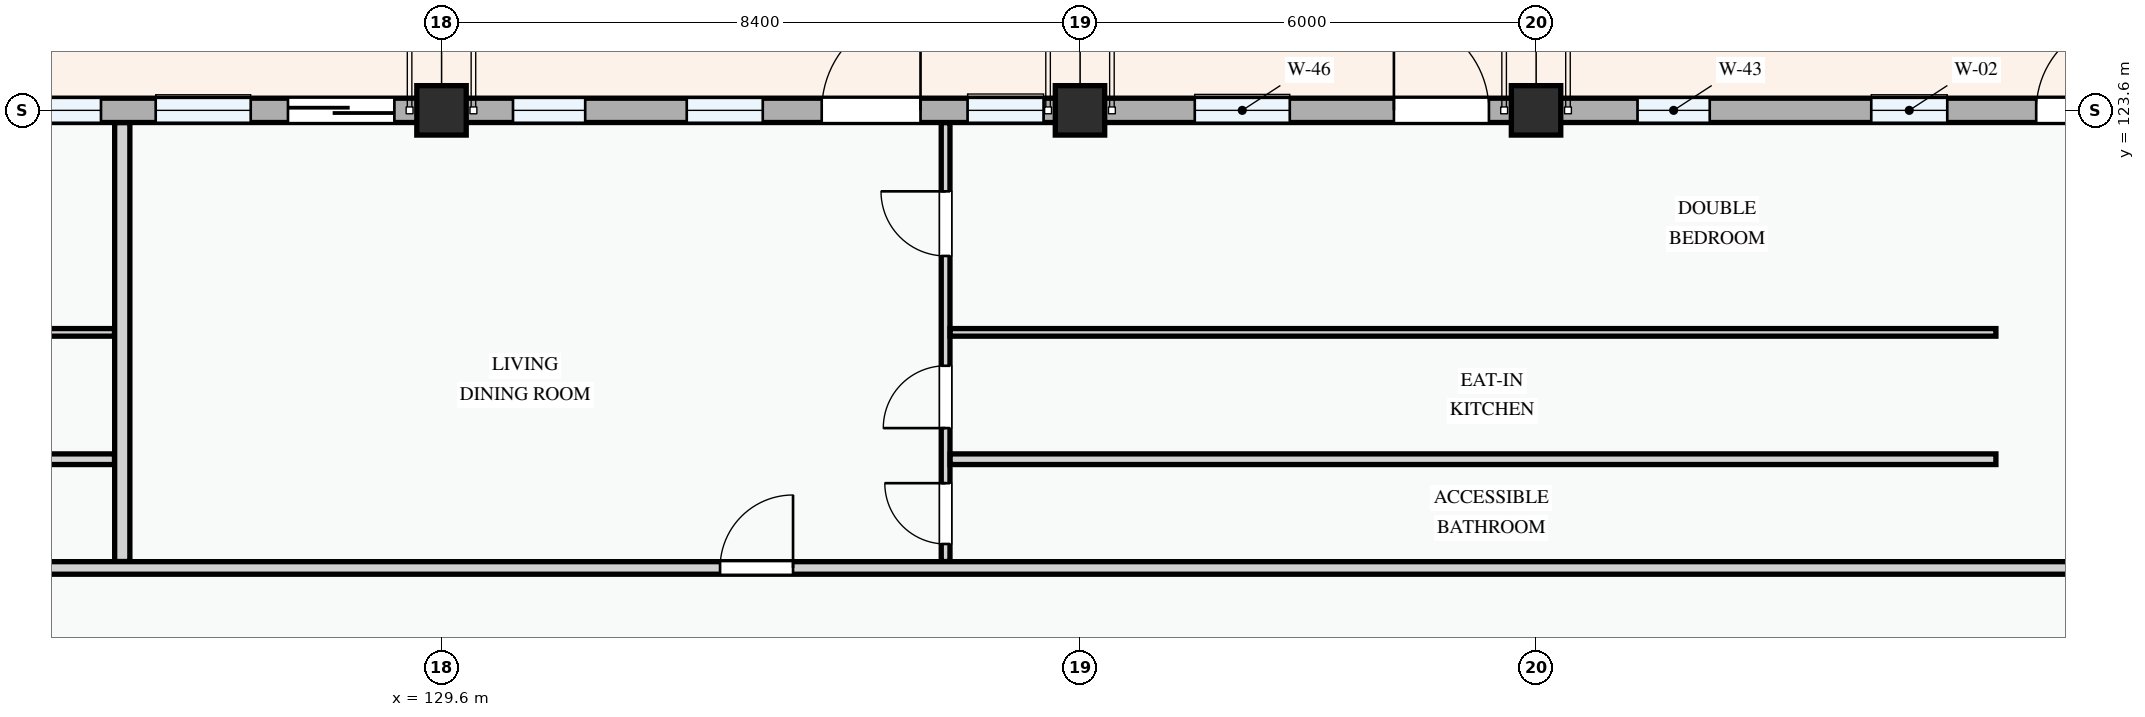
"""IFC4 building model, lengths in metres.
Left out: names, types, materials, properties, quantities, classifications, styles, units other than length and angle.
Written with IfcOpenShell. Run it as: python <this file> out.ifc"""

import sys

from ifc_helpers import new_model, si_unit, direction, frame, frame_2d, origin, origin_2d, place, context, subcontext, project, spatial, rectangle, extrude, element, fill, save


model = new_model("IFC4")
c1 = context("Model", 3, precision=1e-05, world=origin(), true_north=direction((0.0, 1.0)))
c2 = subcontext(c1, "Body", "Model", "MODEL_VIEW")
j1 = project(units=[si_unit("LENGTHUNIT", "METRE"), si_unit("PLANEANGLEUNIT", "RADIAN")], contexts=[c1])
p1 = place(None, origin())
s1 = spatial("IfcSite", under=j1, at=p1, CompositionType="ELEMENT")
p2 = place(p1, origin())
s2 = spatial("IfcBuilding", under=s1, at=p2, CompositionType="ELEMENT")
p3 = place(p2, frame((0.0, 0.0, 18.0)))
s3 = spatial("IfcBuildingStorey", under=s2, at=p3, CompositionType="ELEMENT", Elevation=18.0)
for number, where, z_axis, x_axis in (
    (1, (129.6, 123.6, 0.0), (0.0, 0.0, 1.0), (1.0, 0.0, 0.0)),
    (2, (138.0, 123.6, 0.0), (0.0, 0.0, 1.0), (1.0, 0.0, 0.0)),
    (3, (144.0, 123.6, 0.0), (0.0, 0.0, 1.0), (1.0, 0.0, 0.0)),
):
    element("IfcColumn", number, at=place(p3, frame(where, z_axis=z_axis, x_axis=x_axis)), inside=s3, PredefinedType="COLUMN", context=c2, shape_type="SweptSolid", body=[
        extrude(rectangle(XDim=0.65, YDim=0.65, at=origin_2d()), origin(), (0.0, 0.0, 1.0), 3.3),
    ])
p4 = place(p3, frame((152.4, 123.6, 0.0), z_axis=(0.0, 0.0, 1.0), x_axis=(-1.0, 0.0, 0.0)))
e4 = element("IfcWall", 4, at=p4, inside=s3, PredefinedType="STANDARD", context=c2, shape_type="SweptSolid", body=[
    extrude(rectangle(XDim=8.4, YDim=0.32, at=frame_2d((4.2, 0.0))), origin(), (0.0, 0.0, 1.0), 2.375),
])
p5 = place(p4, frame((0.62, 0.0, 0.0)))
e5 = element("IfcOpeningElement", 5, at=p5, cuts=e4, PredefinedType="OPENING", context=c2, shape_type="SweptSolid", body=[
    extrude(rectangle(XDim=1.2, YDim=2.15, at=frame_2d((0.6, 1.075))), frame((0.0, 0.17, 0.0), z_axis=(0.0, -1.0, 0.0), x_axis=(1.0, 0.0, 0.0)), (0.0, 0.0, 1.0), 0.34),
])
p6 = place(p4, frame((2.99, 0.0, 0.78)))
e6 = element("IfcOpeningElement", 6, at=p6, cuts=e4, PredefinedType="OPENING", context=c2, shape_type="SweptSolid", body=[
    extrude(rectangle(XDim=1.0, YDim=1.25, at=frame_2d((0.5, 0.625))), frame((0.0, 0.17, 0.0), z_axis=(0.0, -1.0, 0.0), x_axis=(1.0, 0.0, 0.0)), (0.0, 0.0, 1.0), 0.34),
])
p7 = place(p4, frame((6.115, 0.0, 0.78)))
e7 = element("IfcOpeningElement", 7, at=p7, cuts=e4, PredefinedType="OPENING", context=c2, shape_type="SweptSolid", body=[
    extrude(rectangle(XDim=0.95, YDim=1.15, at=frame_2d((0.475, 0.575))), frame((0.0, 0.17, 0.0), z_axis=(0.0, -1.0, 0.0), x_axis=(1.0, 0.0, 0.0)), (0.0, 0.0, 1.0), 0.34),
])
p8 = place(p3, frame((144.0, 123.6, 0.0), z_axis=(0.0, 0.0, 1.0), x_axis=(-1.0, 0.0, 0.0)))
e8 = element("IfcWall", 8, at=p8, inside=s3, PredefinedType="STANDARD", context=c2, shape_type="SweptSolid", body=[
    extrude(rectangle(XDim=6.0, YDim=0.32, at=frame_2d((3.0, 0.0))), origin(), (0.0, 0.0, 1.0), 2.475),
])
p9 = place(p8, frame((0.62, 0.0, 0.0)))
e9 = element("IfcOpeningElement", 9, at=p9, cuts=e8, PredefinedType="OPENING", context=c2, shape_type="SweptSolid", body=[
    extrude(rectangle(XDim=1.25, YDim=2.2, at=frame_2d((0.625, 1.1))), frame((0.0, 0.17, 0.0), z_axis=(0.0, -1.0, 0.0), x_axis=(1.0, 0.0, 0.0)), (0.0, 0.0, 1.0), 0.34),
])
p10 = place(p8, frame((3.24, 0.0, 0.78)))
e10 = element("IfcOpeningElement", 10, at=p10, cuts=e8, PredefinedType="OPENING", context=c2, shape_type="SweptSolid", body=[
    extrude(rectangle(XDim=1.25, YDim=1.3, at=frame_2d((0.625, 0.65))), frame((0.0, 0.17, 0.0), z_axis=(0.0, -1.0, 0.0), x_axis=(1.0, 0.0, 0.0)), (0.0, 0.0, 1.0), 0.34),
])
p11 = place(p3, frame((138.0, 123.6, 0.0), z_axis=(0.0, 0.0, 1.0), x_axis=(-1.0, 0.0, 0.0)))
e11 = element("IfcWall", 11, at=p11, inside=s3, PredefinedType="STANDARD", context=c2, shape_type="SweptSolid", body=[
    extrude(rectangle(XDim=8.4, YDim=0.32, at=frame_2d((4.2, 0.0))), origin(), (0.0, 0.0, 1.0), 2.375),
])
p12 = place(p11, frame((2.098, 0.0, 0.0)))
e12 = element("IfcOpeningElement", 12, at=p12, cuts=e11, PredefinedType="OPENING", context=c2, shape_type="SweptSolid", body=[
    extrude(rectangle(XDim=1.3, YDim=2.15, at=frame_2d((0.65, 1.075))), frame((0.0, 0.17, 0.0), z_axis=(0.0, -1.0, 0.0), x_axis=(1.0, 0.0, 0.0)), (0.0, 0.0, 1.0), 0.34),
])
p13 = place(p11, frame((0.479, 0.0, 0.78)))
e13 = element("IfcOpeningElement", 13, at=p13, cuts=e11, PredefinedType="OPENING", context=c2, shape_type="SweptSolid", body=[
    extrude(rectangle(XDim=1.0, YDim=1.25, at=frame_2d((0.5, 0.625))), frame((0.0, 0.17, 0.0), z_axis=(0.0, -1.0, 0.0), x_axis=(1.0, 0.0, 0.0)), (0.0, 0.0, 1.0), 0.34),
])
p14 = place(p11, frame((4.174, 0.0, 0.78)))
e14 = element("IfcOpeningElement", 14, at=p14, cuts=e11, PredefinedType="OPENING", context=c2, shape_type="SweptSolid", body=[
    extrude(rectangle(XDim=1.0, YDim=1.25, at=frame_2d((0.5, 0.625))), frame((0.0, 0.17, 0.0), z_axis=(0.0, -1.0, 0.0), x_axis=(1.0, 0.0, 0.0)), (0.0, 0.0, 1.0), 0.34),
])
p15 = place(p11, frame((6.51, 0.0, 0.78)))
e15 = element("IfcOpeningElement", 15, at=p15, cuts=e11, PredefinedType="OPENING", context=c2, shape_type="SweptSolid", body=[
    extrude(rectangle(XDim=0.95, YDim=1.15, at=frame_2d((0.475, 0.575))), frame((0.0, 0.17, 0.0), z_axis=(0.0, -1.0, 0.0), x_axis=(1.0, 0.0, 0.0)), (0.0, 0.0, 1.0), 0.34),
])
p16 = place(p3, frame((129.6, 123.6, 0.0), z_axis=(0.0, 0.0, 1.0), x_axis=(-1.0, 0.0, 0.0)))
e16 = element("IfcWall", 16, at=p16, inside=s3, PredefinedType="STANDARD", context=c2, shape_type="SweptSolid", body=[
    extrude(rectangle(XDim=6.0, YDim=0.32, at=frame_2d((3.0, 0.0))), origin(), (0.0, 0.0, 1.0), 2.475),
])
p17 = place(p16, frame((0.62, 0.0, 0.0)))
e17 = element("IfcOpeningElement", 17, at=p17, cuts=e16, PredefinedType="OPENING", context=c2, shape_type="SweptSolid", body=[
    extrude(rectangle(XDim=1.4, YDim=2.2, at=frame_2d((0.7, 1.1))), frame((0.0, 0.17, 0.0), z_axis=(0.0, -1.0, 0.0), x_axis=(1.0, 0.0, 0.0)), (0.0, 0.0, 1.0), 0.34),
])
p18 = place(p16, frame((2.51, 0.0, 0.78)))
e18 = element("IfcOpeningElement", 18, at=p18, cuts=e16, PredefinedType="OPENING", context=c2, shape_type="SweptSolid", body=[
    extrude(rectangle(XDim=1.25, YDim=1.45, at=frame_2d((0.625, 0.725))), frame((0.0, 0.17, 0.0), z_axis=(0.0, -1.0, 0.0), x_axis=(1.0, 0.0, 0.0)), (0.0, 0.0, 1.0), 0.34),
])
p19 = place(p16, frame((4.48, 0.0, 0.78)))
e19 = element("IfcOpeningElement", 19, at=p19, cuts=e16, PredefinedType="OPENING", context=c2, shape_type="SweptSolid", body=[
    extrude(rectangle(XDim=1.05, YDim=1.2, at=frame_2d((0.525, 0.6))), frame((0.0, 0.17, 0.0), z_axis=(0.0, -1.0, 0.0), x_axis=(1.0, 0.0, 0.0)), (0.0, 0.0, 1.0), 0.34),
])
p20 = place(p3, frame((113.472, 120.679, 0.0), z_axis=(0.0, 0.0, 1.0), x_axis=(1.0, 0.0, 0.0)))
e20 = element("IfcWall", 20, at=p20, inside=s3, PredefinedType="PARTITIONING", context=c2, shape_type="SweptSolid", body=[
    extrude(rectangle(XDim=11.826, YDim=0.1, at=frame_2d((5.913, 0.0))), origin(), (0.0, 0.0, 1.0), 3.0),
])
p21 = place(p3, frame((113.472, 119.01, 0.0), z_axis=(0.0, 0.0, 1.0), x_axis=(1.0, 0.0, 0.0)))
e21 = element("IfcWall", 21, at=p21, inside=s3, PredefinedType="PARTITIONING", context=c2, shape_type="SweptSolid", body=[
    extrude(rectangle(XDim=11.826, YDim=0.14, at=frame_2d((5.913, 0.0))), origin(), (0.0, 0.0, 1.0), 3.0),
])
p22 = place(p3, frame((136.232, 117.665, 0.0), z_axis=(0.0, 0.0, 1.0), x_axis=(0.0, 1.0, 0.0)))
e22 = element("IfcWall", 22, at=p22, inside=s3, PredefinedType="PARTITIONING", context=c2, shape_type="SweptSolid", body=[
    extrude(rectangle(XDim=5.773, YDim=0.115, at=frame_2d((2.887, 0.0))), origin(), (0.0, 0.0, 1.0), 3.0),
])
p23 = place(p22, frame((0.231, 0.0, 0.0)))
e23 = element("IfcOpeningElement", 23, at=p23, cuts=e22, PredefinedType="OPENING", context=c2, shape_type="SweptSolid", body=[
    extrude(rectangle(XDim=0.8, YDim=2.1, at=frame_2d((0.4, 1.05))), frame((0.0, 0.067, 0.0), z_axis=(0.0, -1.0, 0.0), x_axis=(1.0, 0.0, 0.0)), (0.0, 0.0, 1.0), 0.135),
])
p24 = place(p22, frame((1.755, 0.0, 0.0)))
e24 = element("IfcOpeningElement", 24, at=p24, cuts=e22, PredefinedType="OPENING", context=c2, shape_type="SweptSolid", body=[
    extrude(rectangle(XDim=0.82, YDim=2.08, at=frame_2d((0.41, 1.04))), frame((0.0, 0.067, 0.0), z_axis=(0.0, -1.0, 0.0), x_axis=(1.0, 0.0, 0.0)), (0.0, 0.0, 1.0), 0.135),
])
p25 = place(p22, frame((4.02, 0.0, 0.0)))
e25 = element("IfcOpeningElement", 25, at=p25, cuts=e22, PredefinedType="OPENING", context=c2, shape_type="SweptSolid", body=[
    extrude(rectangle(XDim=0.85, YDim=2.1, at=frame_2d((0.425, 1.05))), frame((0.0, 0.067, 0.0), z_axis=(0.0, -1.0, 0.0), x_axis=(1.0, 0.0, 0.0)), (0.0, 0.0, 1.0), 0.135),
])
p26 = place(p3, frame((136.292, 120.679, 0.0), z_axis=(0.0, 0.0, 1.0), x_axis=(1.0, 0.0, 0.0)))
e26 = element("IfcWall", 26, at=p26, inside=s3, PredefinedType="PARTITIONING", context=c2, shape_type="SweptSolid", body=[
    extrude(rectangle(XDim=13.759, YDim=0.1, at=frame_2d((6.879, 0.0))), origin(), (0.0, 0.0, 1.0), 3.0),
])
p27 = place(p3, frame((136.292, 119.01, 0.0), z_axis=(0.0, 0.0, 1.0), x_axis=(1.0, 0.0, 0.0)))
e27 = element("IfcWall", 27, at=p27, inside=s3, PredefinedType="PARTITIONING", context=c2, shape_type="SweptSolid", body=[
    extrude(rectangle(XDim=13.759, YDim=0.14, at=frame_2d((6.879, 0.0))), origin(), (0.0, 0.0, 1.0), 3.0),
])
p28 = place(p3, frame((125.4, 117.665, 0.0), z_axis=(0.0, 0.0, 1.0), x_axis=(0.0, 1.0, 0.0)))
e28 = element("IfcWall", 28, at=p28, inside=s3, PredefinedType="PARTITIONING", context=c2, shape_type="SweptSolid", body=[
    extrude(rectangle(XDim=5.773, YDim=0.2, at=frame_2d((2.887, 0.0))), origin(), (0.0, 0.0, 1.0), 3.0),
])
p29 = place(p3, frame((80.562, 117.58, 0.0), z_axis=(0.0, 0.0, 1.0), x_axis=(1.0, 0.0, 0.0)))
e29 = element("IfcWall", 29, at=p29, inside=s3, PredefinedType="PARTITIONING", context=c2, shape_type="SweptSolid", body=[
    extrude(rectangle(XDim=71.978, YDim=0.165, at=frame_2d((35.989, 0.0))), origin(), (0.0, 0.0, 1.0), 3.0),
])
p30 = place(p29, frame((9.286, 0.0, 0.0)))
e30 = element("IfcOpeningElement", 30, at=p30, cuts=e29, PredefinedType="OPENING", context=c2, shape_type="SweptSolid", body=[
    extrude(rectangle(XDim=0.92, YDim=2.1, at=frame_2d((0.46, 1.05))), frame((0.0, 0.093, 0.0), z_axis=(0.0, -1.0, 0.0), x_axis=(1.0, 0.0, 0.0)), (0.0, 0.0, 1.0), 0.185),
])
p31 = place(p29, frame((23.993, 0.0, 0.0)))
e31 = element("IfcOpeningElement", 31, at=p31, cuts=e29, PredefinedType="OPENING", context=c2, shape_type="SweptSolid", body=[
    extrude(rectangle(XDim=0.92, YDim=2.1, at=frame_2d((0.46, 1.05))), frame((0.0, 0.093, 0.0), z_axis=(0.0, -1.0, 0.0), x_axis=(1.0, 0.0, 0.0)), (0.0, 0.0, 1.0), 0.185),
])
p32 = place(p29, frame((52.703, 0.0, 0.0)))
e32 = element("IfcOpeningElement", 32, at=p32, cuts=e29, PredefinedType="OPENING", context=c2, shape_type="SweptSolid", body=[
    extrude(rectangle(XDim=0.96, YDim=2.12, at=frame_2d((0.48, 1.06))), frame((0.0, 0.093, 0.0), z_axis=(0.0, -1.0, 0.0), x_axis=(1.0, 0.0, 0.0)), (0.0, 0.0, 1.0), 0.185),
])
p33 = place(p5, frame((1.2, 0.0, 0.0), z_axis=(0.0, 0.0, 1.0), x_axis=(-1.0, 0.0, 0.0)))
e33 = element("IfcDoor", 33, at=p33, inside=s3, OperationType="SINGLE_SWING_RIGHT", PredefinedType="DOOR", context=c2, shape_type="SweptSolid", body=[
    extrude(rectangle(XDim=1.2, YDim=2.15, at=frame_2d((0.6, 1.075))), frame((0.0, 0.025, 0.0), z_axis=(0.0, -1.0, 0.0), x_axis=(1.0, 0.0, 0.0)), (0.0, 0.0, 1.0), 0.05),
])
fill(e5, e33)
p34 = place(p6, origin())
e34 = element("IfcWindow", 34, at=p34, inside=s3, PartitioningType="SINGLE_PANEL", PredefinedType="WINDOW", context=c2, shape_type="SweptSolid", body=[
    extrude(rectangle(XDim=1.0, YDim=1.25, at=frame_2d((0.5, 0.625))), frame((0.0, 0.03, 0.0), z_axis=(0.0, -1.0, 0.0), x_axis=(1.0, 0.0, 0.0)), (0.0, 0.0, 1.0), 0.06),
])
fill(e6, e34)
p35 = place(p7, origin())
e35 = element("IfcWindow", 35, at=p35, inside=s3, PartitioningType="SINGLE_PANEL", PredefinedType="WINDOW", context=c2, shape_type="SweptSolid", body=[
    extrude(rectangle(XDim=0.95, YDim=1.15, at=frame_2d((0.475, 0.575))), frame((0.0, 0.03, 0.0), z_axis=(0.0, -1.0, 0.0), x_axis=(1.0, 0.0, 0.0)), (0.0, 0.0, 1.0), 0.06),
])
fill(e7, e35)
p36 = place(p9, frame((1.25, 0.0, 0.0), z_axis=(0.0, 0.0, 1.0), x_axis=(-1.0, 0.0, 0.0)))
e36 = element("IfcDoor", 36, at=p36, inside=s3, OperationType="SINGLE_SWING_LEFT", PredefinedType="DOOR", context=c2, shape_type="SweptSolid", body=[
    extrude(rectangle(XDim=1.25, YDim=2.2, at=frame_2d((0.625, 1.1))), frame((0.0, 0.025, 0.0), z_axis=(0.0, -1.0, 0.0), x_axis=(1.0, 0.0, 0.0)), (0.0, 0.0, 1.0), 0.05),
])
fill(e9, e36)
p37 = place(p10, origin())
e37 = element("IfcWindow", 37, at=p37, inside=s3, PartitioningType="SINGLE_PANEL", PredefinedType="WINDOW", context=c2, shape_type="SweptSolid", body=[
    extrude(rectangle(XDim=1.25, YDim=1.3, at=frame_2d((0.625, 0.65))), frame((0.0, 0.03, 0.0), z_axis=(0.0, -1.0, 0.0), x_axis=(1.0, 0.0, 0.0)), (0.0, 0.0, 1.0), 0.06),
])
fill(e10, e37)
p38 = place(p12, frame((1.3, 0.0, 0.0), z_axis=(0.0, 0.0, 1.0), x_axis=(-1.0, 0.0, 0.0)))
e38 = element("IfcDoor", 38, at=p38, inside=s3, OperationType="SINGLE_SWING_RIGHT", PredefinedType="DOOR", context=c2, shape_type="SweptSolid", body=[
    extrude(rectangle(XDim=1.3, YDim=2.15, at=frame_2d((0.65, 1.075))), frame((0.0, 0.025, 0.0), z_axis=(0.0, -1.0, 0.0), x_axis=(1.0, 0.0, 0.0)), (0.0, 0.0, 1.0), 0.05),
])
fill(e12, e38)
p39 = place(p13, origin())
e39 = element("IfcWindow", 39, at=p39, inside=s3, PartitioningType="SINGLE_PANEL", PredefinedType="WINDOW", context=c2, shape_type="SweptSolid", body=[
    extrude(rectangle(XDim=1.0, YDim=1.25, at=frame_2d((0.5, 0.625))), frame((0.0, 0.03, 0.0), z_axis=(0.0, -1.0, 0.0), x_axis=(1.0, 0.0, 0.0)), (0.0, 0.0, 1.0), 0.06),
])
fill(e13, e39)
p40 = place(p14, origin())
e40 = element("IfcWindow", 40, at=p40, inside=s3, PartitioningType="SINGLE_PANEL", PredefinedType="WINDOW", context=c2, shape_type="SweptSolid", body=[
    extrude(rectangle(XDim=1.0, YDim=1.25, at=frame_2d((0.5, 0.625))), frame((0.0, 0.03, 0.0), z_axis=(0.0, -1.0, 0.0), x_axis=(1.0, 0.0, 0.0)), (0.0, 0.0, 1.0), 0.06),
])
fill(e14, e40)
p41 = place(p15, origin())
e41 = element("IfcWindow", 41, at=p41, inside=s3, PartitioningType="SINGLE_PANEL", PredefinedType="WINDOW", context=c2, shape_type="SweptSolid", body=[
    extrude(rectangle(XDim=0.95, YDim=1.15, at=frame_2d((0.475, 0.575))), frame((0.0, 0.03, 0.0), z_axis=(0.0, -1.0, 0.0), x_axis=(1.0, 0.0, 0.0)), (0.0, 0.0, 1.0), 0.06),
])
fill(e15, e41)
p42 = place(p17, frame((1.4, 0.0, 0.0), z_axis=(0.0, 0.0, 1.0), x_axis=(-1.0, 0.0, 0.0)))
e42 = element("IfcDoor", 42, at=p42, inside=s3, OperationType="SLIDING_TO_LEFT", PredefinedType="DOOR", context=c2, shape_type="SweptSolid", body=[
    extrude(rectangle(XDim=1.4, YDim=2.2, at=frame_2d((0.7, 1.1))), frame((0.0, 0.025, 0.0), z_axis=(0.0, -1.0, 0.0), x_axis=(1.0, 0.0, 0.0)), (0.0, 0.0, 1.0), 0.05),
])
fill(e17, e42)
p43 = place(p18, origin())
e43 = element("IfcWindow", 43, at=p43, inside=s3, PartitioningType="SINGLE_PANEL", PredefinedType="WINDOW", context=c2, shape_type="SweptSolid", body=[
    extrude(rectangle(XDim=1.25, YDim=1.45, at=frame_2d((0.625, 0.725))), frame((0.0, 0.03, 0.0), z_axis=(0.0, -1.0, 0.0), x_axis=(1.0, 0.0, 0.0)), (0.0, 0.0, 1.0), 0.06),
])
fill(e18, e43)
p44 = place(p19, origin())
e44 = element("IfcWindow", 44, at=p44, inside=s3, PartitioningType="SINGLE_PANEL", PredefinedType="WINDOW", context=c2, shape_type="SweptSolid", body=[
    extrude(rectangle(XDim=1.05, YDim=1.2, at=frame_2d((0.525, 0.6))), frame((0.0, 0.03, 0.0), z_axis=(0.0, -1.0, 0.0), x_axis=(1.0, 0.0, 0.0)), (0.0, 0.0, 1.0), 0.06),
])
fill(e19, e44)
p45 = place(p23, origin())
e45 = element("IfcDoor", 45, at=p45, inside=s3, OperationType="SINGLE_SWING_RIGHT", PredefinedType="DOOR", context=c2, shape_type="SweptSolid", body=[
    extrude(rectangle(XDim=0.8, YDim=2.1, at=frame_2d((0.4, 1.05))), frame((0.0, 0.025, 0.0), z_axis=(0.0, -1.0, 0.0), x_axis=(1.0, 0.0, 0.0)), (0.0, 0.0, 1.0), 0.05),
])
fill(e23, e45)
p46 = place(p24, origin())
e46 = element("IfcDoor", 46, at=p46, inside=s3, OperationType="SINGLE_SWING_LEFT", PredefinedType="DOOR", context=c2, shape_type="SweptSolid", body=[
    extrude(rectangle(XDim=0.82, YDim=2.08, at=frame_2d((0.41, 1.04))), frame((0.0, 0.025, 0.0), z_axis=(0.0, -1.0, 0.0), x_axis=(1.0, 0.0, 0.0)), (0.0, 0.0, 1.0), 0.05),
])
fill(e24, e46)
p47 = place(p25, origin())
e47 = element("IfcDoor", 47, at=p47, inside=s3, OperationType="SINGLE_SWING_RIGHT", PredefinedType="DOOR", context=c2, shape_type="SweptSolid", body=[
    extrude(rectangle(XDim=0.85, YDim=2.1, at=frame_2d((0.425, 1.05))), frame((0.0, 0.025, 0.0), z_axis=(0.0, -1.0, 0.0), x_axis=(1.0, 0.0, 0.0)), (0.0, 0.0, 1.0), 0.05),
])
fill(e25, e47)
p48 = place(p32, origin())
e48 = element("IfcDoor", 48, at=p48, inside=s3, OperationType="SINGLE_SWING_RIGHT", PredefinedType="DOOR", context=c2, shape_type="SweptSolid", body=[
    extrude(rectangle(XDim=0.96, YDim=2.12, at=frame_2d((0.48, 1.06))), frame((0.0, 0.025, 0.0), z_axis=(0.0, -1.0, 0.0), x_axis=(1.0, 0.0, 0.0)), (0.0, 0.0, 1.0), 0.05),
])
fill(e32, e48)
save(model, sys.argv[1])
